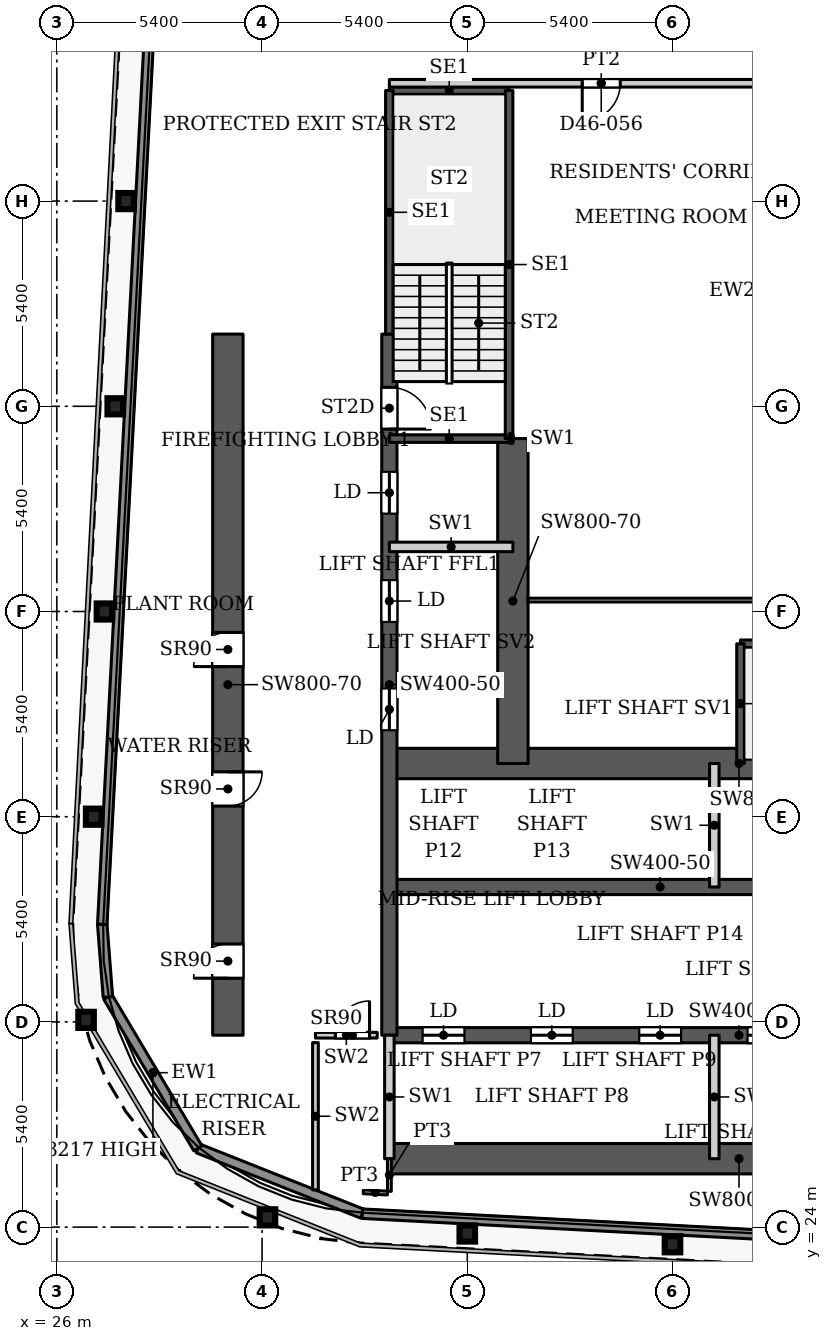
"""IFC4 building model, lengths in metres.
Left out: names, types, materials, properties, quantities, classifications, styles, units other than length and angle.
Written with IfcOpenShell. Run it as: python <this file> out.ifc"""

import sys

from ifc_helpers import new_model, si_unit, direction, frame, frame_2d, origin, origin_2d, place, context, subcontext, project, spatial, rectangle, i_section, extrude, source, transform, mapped, element, fill, save


model = new_model("IFC4")
c1 = context("Model", 3, precision=1e-05, world=origin(), true_north=direction((0.0, 1.0)))
c2 = subcontext(c1, "Body", "Model", "MODEL_VIEW")
j1 = project(units=[si_unit("LENGTHUNIT", "METRE"), si_unit("PLANEANGLEUNIT", "RADIAN")], contexts=[c1])
p1 = place(None, origin())
s1 = spatial("IfcSite", under=j1, at=p1, CompositionType="ELEMENT")
p2 = place(p1, origin())
s2 = spatial("IfcBuilding", under=s1, at=p2, CompositionType="ELEMENT")
p3 = place(p2, frame((0.0, 0.0, 199.4)))
s3 = spatial("IfcBuildingStorey", under=s2, at=p3, CompositionType="ELEMENT", Elevation=199.4)
for number, where, z_axis, x_axis in (
    (1, (42.2, 23.548, 0.0), (0.0, 0.0, 1.0), (1.0, 0.0, 0.0)),
    (2, (36.8, 23.832, 0.0), (0.0, 0.0, 1.0), (1.0, 0.0, 0.0)),
    (3, (31.542, 24.257, 0.0), (0.0, 0.0, 1.0), (1.0, 0.0, 0.0)),
    (4, (26.769, 29.454, 0.0), (0.0, 0.0, 1.0), (1.0, 0.0, 0.0)),
    (5, (26.969, 34.8, 0.0), (0.0, 0.0, 1.0), (1.0, 0.0, 0.0)),
    (6, (27.253, 40.2, 0.0), (0.0, 0.0, 1.0), (1.0, 0.0, 0.0)),
    (7, (27.537, 45.6, 0.0), (0.0, 0.0, 1.0), (1.0, 0.0, 0.0)),
    (8, (27.822, 51.0, 0.0), (0.0, 0.0, 1.0), (1.0, 0.0, 0.0)),
):
    element("IfcColumn", number, at=place(p3, frame(where, z_axis=z_axis, x_axis=x_axis)), inside=s3, PredefinedType="COLUMN", context=c2, shape_type="SweptSolid", body=[
        extrude(i_section(OverallWidth=0.409, OverallDepth=0.425, WebThickness=0.033, FlangeThickness=0.052, FilletRadius=0.013, at=origin_2d()), origin(), (0.0, 0.0, 1.0), 3.9),
    ])
p4 = place(p3, frame((34.75, 25.8, 0.0), z_axis=(0.0, 0.0, 1.0), x_axis=(1.0, 0.0, 0.0)))
e9 = element("IfcWall", 9, at=p4, inside=s3, PredefinedType="SHEAR", context=c2, shape_type="SweptSolid", body=[
    extrude(rectangle(XDim=18.4, YDim=0.8, at=frame_2d((9.2, 0.0))), origin(), (0.0, 0.0, 1.0), 3.9),
])
p5 = place(p3, frame((34.75, 29.05, 0.0), z_axis=(0.0, 0.0, 1.0), x_axis=(1.0, 0.0, 0.0)))
e10 = element("IfcWall", 10, at=p5, inside=s3, PredefinedType="SHEAR", context=c2, shape_type="SweptSolid", body=[
    extrude(rectangle(XDim=18.4, YDim=0.4, at=frame_2d((9.2, 0.0))), origin(), (0.0, 0.0, 1.0), 3.9),
])
p6 = place(p5, frame((0.875, 0.0, 0.0)))
e11 = element("IfcOpeningElement", 11, at=p6, cuts=e10, PredefinedType="OPENING", context=c2, shape_type="SweptSolid", body=[
    extrude(rectangle(XDim=1.1, YDim=2.2, at=frame_2d((0.55, 1.1))), frame((0.0, 0.21, 0.0), z_axis=(0.0, -1.0, 0.0), x_axis=(1.0, 0.0, 0.0)), (0.0, 0.0, 1.0), 0.42),
])
p7 = place(p5, frame((3.725, 0.0, 0.0)))
e12 = element("IfcOpeningElement", 12, at=p7, cuts=e10, PredefinedType="OPENING", context=c2, shape_type="SweptSolid", body=[
    extrude(rectangle(XDim=1.1, YDim=2.2, at=frame_2d((0.55, 1.1))), frame((0.0, 0.21, 0.0), z_axis=(0.0, -1.0, 0.0), x_axis=(1.0, 0.0, 0.0)), (0.0, 0.0, 1.0), 0.42),
])
p8 = place(p5, frame((6.575, 0.0, 0.0)))
e13 = element("IfcOpeningElement", 13, at=p8, cuts=e10, PredefinedType="OPENING", context=c2, shape_type="SweptSolid", body=[
    extrude(rectangle(XDim=1.1, YDim=2.2, at=frame_2d((0.55, 1.1))), frame((0.0, 0.21, 0.0), z_axis=(0.0, -1.0, 0.0), x_axis=(1.0, 0.0, 0.0)), (0.0, 0.0, 1.0), 0.42),
])
p9 = place(p5, frame((9.425, 0.0, 0.0)))
e14 = element("IfcOpeningElement", 14, at=p9, cuts=e10, PredefinedType="OPENING", context=c2, shape_type="SweptSolid", body=[
    extrude(rectangle(XDim=1.1, YDim=2.2, at=frame_2d((0.55, 1.1))), frame((0.0, 0.21, 0.0), z_axis=(0.0, -1.0, 0.0), x_axis=(1.0, 0.0, 0.0)), (0.0, 0.0, 1.0), 0.42),
])
p10 = place(p5, frame((12.275, 0.0, 0.0)))
e15 = element("IfcOpeningElement", 15, at=p10, cuts=e10, PredefinedType="OPENING", context=c2, shape_type="SweptSolid", body=[
    extrude(rectangle(XDim=1.1, YDim=2.2, at=frame_2d((0.55, 1.1))), frame((0.0, 0.21, 0.0), z_axis=(0.0, -1.0, 0.0), x_axis=(1.0, 0.0, 0.0)), (0.0, 0.0, 1.0), 0.42),
])
p11 = place(p5, frame((15.125, 0.0, 0.0)))
e16 = element("IfcOpeningElement", 16, at=p11, cuts=e10, PredefinedType="OPENING", context=c2, shape_type="SweptSolid", body=[
    extrude(rectangle(XDim=1.1, YDim=2.2, at=frame_2d((0.55, 1.1))), frame((0.0, 0.21, 0.0), z_axis=(0.0, -1.0, 0.0), x_axis=(1.0, 0.0, 0.0)), (0.0, 0.0, 1.0), 0.42),
])
p12 = place(p3, frame((34.75, 32.95, 0.0), z_axis=(0.0, 0.0, 1.0), x_axis=(1.0, 0.0, 0.0)))
e17 = element("IfcWall", 17, at=p12, inside=s3, PredefinedType="SHEAR", context=c2, shape_type="SweptSolid", body=[
    extrude(rectangle(XDim=14.25, YDim=0.4, at=frame_2d((7.125, 0.0))), origin(), (0.0, 0.0, 1.0), 3.9),
])
p13 = place(p3, frame((34.75, 36.2, 0.0), z_axis=(0.0, 0.0, 1.0), x_axis=(1.0, 0.0, 0.0)))
e18 = element("IfcWall", 18, at=p13, inside=s3, PredefinedType="SHEAR", context=c2, shape_type="SweptSolid", body=[
    extrude(rectangle(XDim=18.4, YDim=0.8, at=frame_2d((9.2, 0.0))), origin(), (0.0, 0.0, 1.0), 3.9),
])
p14 = place(p13, frame((16.9, 0.0, 0.0)))
e19 = element("IfcOpeningElement", 19, at=p14, cuts=e18, PredefinedType="OPENING", context=c2, shape_type="SweptSolid", body=[
    extrude(rectangle(XDim=1.0, YDim=2.2, at=frame_2d((0.5, 1.1))), frame((0.0, 0.41, 0.0), z_axis=(0.0, -1.0, 0.0), x_axis=(1.0, 0.0, 0.0)), (0.0, 0.0, 1.0), 0.82),
])
p15 = place(p3, frame((34.75, 29.05, 0.0), z_axis=(0.0, 0.0, 1.0), x_axis=(0.0, 1.0, 0.0)))
e20 = element("IfcWall", 20, at=p15, inside=s3, PredefinedType="SHEAR", context=c2, shape_type="SweptSolid", body=[
    extrude(rectangle(XDim=18.45, YDim=0.4, at=frame_2d((9.225, 0.0))), origin(), (0.0, 0.0, 1.0), 3.9),
])
p16 = place(p15, frame((8.025, 0.0, 0.0)))
e21 = element("IfcOpeningElement", 21, at=p16, cuts=e20, PredefinedType="OPENING", context=c2, shape_type="SweptSolid", body=[
    extrude(rectangle(XDim=1.1, YDim=2.2, at=frame_2d((0.55, 1.1))), frame((0.0, 0.21, 0.0), z_axis=(0.0, -1.0, 0.0), x_axis=(1.0, 0.0, 0.0)), (0.0, 0.0, 1.0), 0.42),
])
p17 = place(p15, frame((10.875, 0.0, 0.0)))
e22 = element("IfcOpeningElement", 22, at=p17, cuts=e20, PredefinedType="OPENING", context=c2, shape_type="SweptSolid", body=[
    extrude(rectangle(XDim=1.1, YDim=2.2, at=frame_2d((0.55, 1.1))), frame((0.0, 0.21, 0.0), z_axis=(0.0, -1.0, 0.0), x_axis=(1.0, 0.0, 0.0)), (0.0, 0.0, 1.0), 0.42),
])
p18 = place(p15, frame((13.725, 0.0, 0.0)))
e23 = element("IfcOpeningElement", 23, at=p18, cuts=e20, PredefinedType="OPENING", context=c2, shape_type="SweptSolid", body=[
    extrude(rectangle(XDim=1.1, YDim=2.2, at=frame_2d((0.55, 1.1))), frame((0.0, 0.21, 0.0), z_axis=(0.0, -1.0, 0.0), x_axis=(1.0, 0.0, 0.0)), (0.0, 0.0, 1.0), 0.42),
])
p19 = place(p15, frame((15.95, 0.0, 0.0)))
e24 = element("IfcOpeningElement", 24, at=p19, cuts=e20, PredefinedType="OPENING", context=c2, shape_type="SweptSolid", body=[
    extrude(rectangle(XDim=1.1, YDim=2.2, at=frame_2d((0.55, 1.1))), frame((0.0, 0.21, 0.0), z_axis=(0.0, -1.0, 0.0), x_axis=(1.0, 0.0, 0.0)), (0.0, 0.0, 1.0), 0.42),
])
p20 = place(p3, frame((38.0, 36.2, 0.0), z_axis=(0.0, 0.0, 1.0), x_axis=(0.0, 1.0, 0.0)))
e25 = element("IfcWall", 25, at=p20, inside=s3, PredefinedType="SHEAR", context=c2, shape_type="SweptSolid", body=[
    extrude(rectangle(XDim=8.55, YDim=0.8, at=frame_2d((4.275, 0.0))), origin(), (0.0, 0.0, 1.0), 3.9),
])
p21 = place(p3, frame((30.5, 29.05, 0.0), z_axis=(0.0, 0.0, 1.0), x_axis=(0.0, 1.0, 0.0)))
e26 = element("IfcWall", 26, at=p21, inside=s3, PredefinedType="SHEAR", context=c2, shape_type="SweptSolid", body=[
    extrude(rectangle(XDim=18.45, YDim=0.8, at=frame_2d((9.225, 0.0))), origin(), (0.0, 0.0, 1.0), 3.9),
])
p22 = place(p21, frame((1.5, 0.0, 0.0)))
e27 = element("IfcOpeningElement", 27, at=p22, cuts=e26, PredefinedType="OPENING", context=c2, shape_type="SweptSolid", body=[
    extrude(rectangle(XDim=0.9, YDim=2.2, at=frame_2d((0.45, 1.1))), frame((0.0, 0.41, 0.0), z_axis=(0.0, -1.0, 0.0), x_axis=(1.0, 0.0, 0.0)), (0.0, 0.0, 1.0), 0.82),
])
p23 = place(p21, frame((6.03, 0.0, 0.0)))
e28 = element("IfcOpeningElement", 28, at=p23, cuts=e26, PredefinedType="OPENING", context=c2, shape_type="SweptSolid", body=[
    extrude(rectangle(XDim=0.9, YDim=2.2, at=frame_2d((0.45, 1.1))), frame((0.0, 0.41, 0.0), z_axis=(0.0, -1.0, 0.0), x_axis=(1.0, 0.0, 0.0)), (0.0, 0.0, 1.0), 0.82),
])
p24 = place(p21, frame((9.7, 0.0, 0.0)))
e29 = element("IfcOpeningElement", 29, at=p24, cuts=e26, PredefinedType="OPENING", context=c2, shape_type="SweptSolid", body=[
    extrude(rectangle(XDim=0.9, YDim=2.2, at=frame_2d((0.45, 1.1))), frame((0.0, 0.41, 0.0), z_axis=(0.0, -1.0, 0.0), x_axis=(1.0, 0.0, 0.0)), (0.0, 0.0, 1.0), 0.82),
])
p25 = place(p3, frame((34.039, 24.353, 0.0), z_axis=(0.0, 0.0, 1.0), x_axis=(-0.929352825399, 0.369192803184, 0.0)))
e30 = element("IfcWall", 30, at=p25, inside=s3, PredefinedType="SOLIDWALL", context=c2, shape_type="SweptSolid", body=[
    extrude(rectangle(XDim=4.656, YDim=0.25, at=frame_2d((2.328, 0.0))), origin(), (0.0, 0.0, 1.0), 3.75),
])
p26 = place(p3, frame((29.712, 26.072, 0.0), z_axis=(0.0, 0.0, 1.0), x_axis=(-0.511028049012, 0.859564036662, 0.0)))
e31 = element("IfcWall", 31, at=p26, inside=s3, PredefinedType="SOLIDWALL", context=c2, shape_type="SweptSolid", body=[
    extrude(rectangle(XDim=4.634, YDim=0.25, at=frame_2d((2.317, 0.0))), origin(), (0.0, 0.0, 1.0), 3.217),
])
p27 = place(p3, frame((27.344, 30.055, 0.0), z_axis=(0.0, 0.0, 1.0), x_axis=(-0.077571675317, 0.99698677784, 0.0)))
e32 = element("IfcWall", 32, at=p27, inside=s3, PredefinedType="SOLIDWALL", context=c2, shape_type="SweptSolid", body=[
    extrude(rectangle(XDim=1.92, YDim=0.25, at=frame_2d((0.96, 0.0))), origin(), (0.0, 0.0, 1.0), 3.75),
])
p28 = place(p3, frame((27.195, 31.969, 0.0), z_axis=(0.0, 0.0, 1.0), x_axis=(0.052554995867, 0.998618031286, 0.0)))
e33 = element("IfcWall", 33, at=p28, inside=s3, PredefinedType="SOLIDWALL", context=c2, shape_type="SweptSolid", body=[
    extrude(rectangle(XDim=66.787, YDim=0.25, at=frame_2d((33.394, 0.0))), origin(), (0.0, 0.0, 1.0), 3.75),
])
p29 = place(p3, frame((100.586, 20.85, 0.0), z_axis=(0.0, 0.0, 1.0), x_axis=(-0.99861746497, 0.052565755559, 0.0)))
e34 = element("IfcWall", 34, at=p29, inside=s3, PredefinedType="SOLIDWALL", context=c2, shape_type="SweptSolid", body=[
    extrude(rectangle(XDim=66.639, YDim=0.25, at=frame_2d((33.319, 0.0))), origin(), (0.0, 0.0, 1.0), 3.75),
])
p30 = place(p3, frame((43.99, 39.35, 0.0), z_axis=(0.0, 0.0, 1.0), x_axis=(1.0, 0.0, 0.0)))
e35 = element("IfcWall", 35, at=p30, inside=s3, PredefinedType="SHEAR", context=c2, shape_type="SweptSolid", body=[
    extrude(rectangle(XDim=9.16, YDim=0.2, at=frame_2d((4.58, 0.0))), origin(), (0.0, 0.0, 1.0), 3.9),
])
p31 = place(p3, frame((43.99, 36.2, 0.0), z_axis=(0.0, 0.0, 1.0), x_axis=(0.0, 1.0, 0.0)))
e36 = element("IfcWall", 36, at=p31, inside=s3, PredefinedType="SHEAR", context=c2, shape_type="SweptSolid", body=[
    extrude(rectangle(XDim=3.15, YDim=0.2, at=frame_2d((1.575, 0.0))), origin(), (0.0, 0.0, 1.0), 3.9),
])
for number, where, z_axis, x_axis in (
    (37, (34.75, 44.75, 0.0), (0.0, 0.0, 1.0), (1.0, 0.0, 0.0)),
    (38, (34.75, 53.91, 0.0), (0.0, 0.0, 1.0), (1.0, 0.0, 0.0)),
):
    element("IfcWall", number, at=place(p3, frame(where, z_axis=z_axis, x_axis=x_axis)), inside=s3, PredefinedType="SHEAR", context=c2, shape_type="SweptSolid", body=[
        extrude(rectangle(XDim=3.15, YDim=0.2, at=frame_2d((1.575, 0.0))), origin(), (0.0, 0.0, 1.0), 3.9),
    ])
p32 = place(p3, frame((34.75, 47.5, 0.0), z_axis=(0.0, 0.0, 1.0), x_axis=(0.0, 1.0, 0.0)))
e39 = element("IfcWall", 39, at=p32, inside=s3, PredefinedType="SHEAR", context=c2, shape_type="SweptSolid", body=[
    extrude(rectangle(XDim=6.41, YDim=0.2, at=frame_2d((3.205, 0.0))), origin(), (0.0, 0.0, 1.0), 3.9),
])
p33 = place(p3, frame((37.9, 44.75, 0.0), z_axis=(0.0, 0.0, 1.0), x_axis=(0.0, 1.0, 0.0)))
e40 = element("IfcWall", 40, at=p33, inside=s3, PredefinedType="SHEAR", context=c2, shape_type="SweptSolid", body=[
    extrude(rectangle(XDim=9.16, YDim=0.2, at=frame_2d((4.58, 0.0))), origin(), (0.0, 0.0, 1.0), 3.9),
])
for number, where, z_axis, x_axis in (
    (41, (34.75, 25.8, 0.0), (0.0, 0.0, 1.0), (0.0, 1.0, 0.0)),
    (42, (43.3, 25.8, 0.0), (0.0, 0.0, 1.0), (0.0, 1.0, 0.0)),
    (43, (43.3, 32.95, 0.0), (0.0, 0.0, 1.0), (0.0, 1.0, 0.0)),
    (44, (34.75, 41.9, 0.0), (0.0, 0.0, 1.0), (1.0, 0.0, 0.0)),
):
    element("IfcWall", number, at=place(p3, frame(where, z_axis=z_axis, x_axis=x_axis)), inside=s3, PredefinedType="PARTITIONING", context=c2, shape_type="SweptSolid", body=[
        extrude(rectangle(XDim=3.25, YDim=0.25, at=frame_2d((1.625, 0.0))), origin(), (0.0, 0.0, 1.0), 3.9),
    ])
p34 = place(p3, frame((37.9, 44.75, 0.0), z_axis=(0.0, 0.0, 1.0), x_axis=(1.0, 0.0, 0.0)))
e45 = element("IfcWall", 45, at=p34, inside=s3, PredefinedType="PARTITIONING", context=c2, shape_type="SweptSolid", body=[
    extrude(rectangle(XDim=0.1, YDim=0.25, at=frame_2d((0.05, 0.0))), origin(), (0.0, 0.0, 1.0), 3.9),
])
p35 = place(p3, frame((32.805, 29.05, 0.0), z_axis=(0.0, 0.0, 1.0), x_axis=(1.0, 0.0, 0.0)))
e46 = element("IfcWall", 46, at=p35, inside=s3, PredefinedType="PARTITIONING", context=c2, shape_type="SweptSolid", body=[
    extrude(rectangle(XDim=1.625, YDim=0.15, at=frame_2d((0.812, 0.0))), origin(), (0.0, 0.0, 1.0), 3.9),
])
p36 = place(p35, frame((0.523, 0.0, 0.0)))
e47 = element("IfcOpeningElement", 47, at=p36, cuts=e46, PredefinedType="OPENING", context=c2, shape_type="SweptSolid", body=[
    extrude(rectangle(XDim=0.9, YDim=2.2, at=frame_2d((0.45, 1.1))), frame((0.0, 0.085, 0.0), z_axis=(0.0, -1.0, 0.0), x_axis=(1.0, 0.0, 0.0)), (0.0, 0.0, 1.0), 0.17),
])
p37 = place(p3, frame((32.805, 24.98, 0.0), z_axis=(0.0, 0.0, 1.0), x_axis=(0.0, 1.0, 0.0)))
e48 = element("IfcWall", 48, at=p37, inside=s3, PredefinedType="PARTITIONING", context=c2, shape_type="SweptSolid", body=[
    extrude(rectangle(XDim=3.875, YDim=0.15, at=frame_2d((1.938, 0.0))), origin(), (0.0, 0.0, 1.0), 3.9),
])
p38 = place(p3, frame((34.063, 24.929, 0.0), z_axis=(0.0, 0.0, 1.0), x_axis=(0.998663963404, -0.051674831376, 0.0)))
e49 = element("IfcWall", 49, at=p38, inside=s3, PredefinedType="PARTITIONING", context=c2, shape_type="SweptSolid", body=[
    extrude(rectangle(XDim=0.638, YDim=0.1, at=frame_2d((0.319, 0.0))), origin(), (0.0, 0.0, 1.0), 3.6),
])
p39 = place(p3, frame((34.75, 24.942, 0.0), z_axis=(0.0, 0.0, 1.0), x_axis=(0.0, 1.0, 0.0)))
e50 = element("IfcWall", 50, at=p39, inside=s3, PredefinedType="PARTITIONING", context=c2, shape_type="SweptSolid", body=[
    extrude(rectangle(XDim=0.858, YDim=0.1, at=frame_2d((0.429, 0.0))), origin(), (0.0, 0.0, 1.0), 3.6),
])
p40 = place(p3, frame((34.75, 54.1, 0.0), z_axis=(0.0, 0.0, 1.0), x_axis=(1.0, 0.0, 0.0)))
e51 = element("IfcWall", 51, at=p40, inside=s3, PredefinedType="PARTITIONING", context=c2, shape_type="SweptSolid", body=[
    extrude(rectangle(XDim=11.15, YDim=0.2, at=frame_2d((5.575, 0.0))), origin(), (0.0, 0.0, 1.0), 3.6),
])
p41 = place(p40, frame((5.075, 0.0, 0.0)))
e52 = element("IfcOpeningElement", 52, at=p41, cuts=e51, PredefinedType="OPENING", context=c2, shape_type="SweptSolid", body=[
    extrude(rectangle(XDim=1.0, YDim=2.1, at=frame_2d((0.5, 1.05))), frame((0.0, 0.11, 0.0), z_axis=(0.0, -1.0, 0.0), x_axis=(1.0, 0.0, 0.0)), (0.0, 0.0, 1.0), 0.22),
])
p42 = place(p3, frame((38.399, 40.5, 0.0), z_axis=(0.0, 0.0, 1.0), x_axis=(1.0, 0.0, 0.0)))
e53 = element("IfcWall", 53, at=p42, inside=s3, PredefinedType="PARTITIONING", context=c2, shape_type="SweptSolid", body=[
    extrude(rectangle(XDim=14.901, YDim=0.1, at=frame_2d((7.451, 0.0))), origin(), (0.0, 0.0, 1.0), 3.6),
])
p43 = place(p42, frame((6.801, 0.0, 0.0)))
e54 = element("IfcOpeningElement", 54, at=p43, cuts=e53, PredefinedType="OPENING", context=c2, shape_type="SweptSolid", body=[
    extrude(rectangle(XDim=1.0, YDim=2.1, at=frame_2d((0.5, 1.05))), frame((0.0, 0.06, 0.0), z_axis=(0.0, -1.0, 0.0), x_axis=(1.0, 0.0, 0.0)), (0.0, 0.0, 1.0), 0.12),
])
m1 = source(origin(), c2, "Body", "SweptSolid", [
    extrude(rectangle(XDim=1.1, YDim=2.2, at=frame_2d((0.55, 1.1))), frame((0.0, 0.025, 0.0), z_axis=(0.0, -1.0, 0.0), x_axis=(1.0, 0.0, 0.0)), (0.0, 0.0, 1.0), 0.05),
])
p44 = place(p6, origin())
e55 = element("IfcDoor", 55, at=p44, inside=s3, OperationType="SLIDING_TO_LEFT", PredefinedType="DOOR", context=c2, shape_type="MappedRepresentation", body=[
    mapped(m1, transform((0.0, 0.0, 0.0), x_axis=(1.0, 0.0, 0.0), y_axis=(0.0, 1.0, 0.0), z_axis=(0.0, 0.0, 1.0), scale=1.0)),
])
fill(e11, e55)
p45 = place(p7, origin())
e56 = element("IfcDoor", 56, at=p45, inside=s3, OperationType="SLIDING_TO_LEFT", PredefinedType="DOOR", context=c2, shape_type="MappedRepresentation", body=[
    mapped(m1, transform((0.0, 0.0, 0.0), x_axis=(1.0, 0.0, 0.0), y_axis=(0.0, 1.0, 0.0), z_axis=(0.0, 0.0, 1.0), scale=1.0)),
])
fill(e12, e56)
p46 = place(p8, origin())
e57 = element("IfcDoor", 57, at=p46, inside=s3, OperationType="SLIDING_TO_LEFT", PredefinedType="DOOR", context=c2, shape_type="MappedRepresentation", body=[
    mapped(m1, transform((0.0, 0.0, 0.0), x_axis=(1.0, 0.0, 0.0), y_axis=(0.0, 1.0, 0.0), z_axis=(0.0, 0.0, 1.0), scale=1.0)),
])
fill(e13, e57)
p47 = place(p9, origin())
e58 = element("IfcDoor", 58, at=p47, inside=s3, OperationType="SLIDING_TO_LEFT", PredefinedType="DOOR", context=c2, shape_type="MappedRepresentation", body=[
    mapped(m1, transform((0.0, 0.0, 0.0), x_axis=(1.0, 0.0, 0.0), y_axis=(0.0, 1.0, 0.0), z_axis=(0.0, 0.0, 1.0), scale=1.0)),
])
fill(e14, e58)
p48 = place(p16, origin())
e59 = element("IfcDoor", 59, at=p48, inside=s3, OperationType="SLIDING_TO_LEFT", PredefinedType="DOOR", context=c2, shape_type="MappedRepresentation", body=[
    mapped(m1, transform((0.0, 0.0, 0.0), x_axis=(1.0, 0.0, 0.0), y_axis=(0.0, 1.0, 0.0), z_axis=(0.0, 0.0, 1.0), scale=1.0)),
])
fill(e21, e59)
p49 = place(p17, origin())
e60 = element("IfcDoor", 60, at=p49, inside=s3, OperationType="SLIDING_TO_LEFT", PredefinedType="DOOR", context=c2, shape_type="MappedRepresentation", body=[
    mapped(m1, transform((0.0, 0.0, 0.0), x_axis=(1.0, 0.0, 0.0), y_axis=(0.0, 1.0, 0.0), z_axis=(0.0, 0.0, 1.0), scale=1.0)),
])
fill(e22, e60)
p50 = place(p18, origin())
e61 = element("IfcDoor", 61, at=p50, inside=s3, OperationType="SLIDING_TO_LEFT", PredefinedType="DOOR", context=c2, shape_type="MappedRepresentation", body=[
    mapped(m1, transform((0.0, 0.0, 0.0), x_axis=(1.0, 0.0, 0.0), y_axis=(0.0, 1.0, 0.0), z_axis=(0.0, 0.0, 1.0), scale=1.0)),
])
fill(e23, e61)
m2 = source(origin(), c2, "Body", "SweptSolid", [
    extrude(rectangle(XDim=0.9, YDim=2.2, at=frame_2d((0.45, 1.1))), frame((0.0, 0.025, 0.0), z_axis=(0.0, -1.0, 0.0), x_axis=(1.0, 0.0, 0.0)), (0.0, 0.0, 1.0), 0.05),
])
p51 = place(p22, origin())
e62 = element("IfcDoor", 62, at=p51, inside=s3, OperationType="SINGLE_SWING_LEFT", PredefinedType="DOOR", context=c2, shape_type="MappedRepresentation", body=[
    mapped(m2, transform((0.0, 0.0, 0.0), x_axis=(1.0, 0.0, 0.0), y_axis=(0.0, 1.0, 0.0), z_axis=(0.0, 0.0, 1.0), scale=1.0)),
])
fill(e27, e62)
p52 = place(p23, origin())
e63 = element("IfcDoor", 63, at=p52, inside=s3, OperationType="SINGLE_SWING_RIGHT", PredefinedType="DOOR", context=c2, shape_type="MappedRepresentation", body=[
    mapped(m2, transform((0.0, 0.0, 0.0), x_axis=(1.0, 0.0, 0.0), y_axis=(0.0, 1.0, 0.0), z_axis=(0.0, 0.0, 1.0), scale=1.0)),
])
fill(e28, e63)
p53 = place(p24, origin())
e64 = element("IfcDoor", 64, at=p53, inside=s3, OperationType="SINGLE_SWING_LEFT", PredefinedType="DOOR", context=c2, shape_type="MappedRepresentation", body=[
    mapped(m2, transform((0.0, 0.0, 0.0), x_axis=(1.0, 0.0, 0.0), y_axis=(0.0, 1.0, 0.0), z_axis=(0.0, 0.0, 1.0), scale=1.0)),
])
fill(e29, e64)
p54 = place(p36, origin())
e65 = element("IfcDoor", 65, at=p54, inside=s3, OperationType="SINGLE_SWING_LEFT", PredefinedType="DOOR", context=c2, shape_type="MappedRepresentation", body=[
    mapped(m2, transform((0.0, 0.0, 0.0), x_axis=(1.0, 0.0, 0.0), y_axis=(0.0, 1.0, 0.0), z_axis=(0.0, 0.0, 1.0), scale=1.0)),
])
fill(e47, e65)
m3 = source(origin(), c2, "Body", "SweptSolid", [
    extrude(rectangle(XDim=1.1, YDim=2.2, at=frame_2d((0.55, 1.1))), frame((0.0, 0.025, 0.0), z_axis=(0.0, -1.0, 0.0), x_axis=(1.0, 0.0, 0.0)), (0.0, 0.0, 1.0), 0.05),
])
p55 = place(p19, origin())
e66 = element("IfcDoor", 66, at=p55, inside=s3, OperationType="SINGLE_SWING_RIGHT", PredefinedType="DOOR", context=c2, shape_type="MappedRepresentation", body=[
    mapped(m3, transform((0.0, 0.0, 0.0), x_axis=(1.0, 0.0, 0.0), y_axis=(0.0, 1.0, 0.0), z_axis=(0.0, 0.0, 1.0), scale=1.0)),
])
fill(e24, e66)
m4 = source(origin(), c2, "Body", "SweptSolid", [
    extrude(rectangle(XDim=1.0, YDim=2.1, at=frame_2d((0.5, 1.05))), frame((0.0, 0.025, 0.0), z_axis=(0.0, -1.0, 0.0), x_axis=(1.0, 0.0, 0.0)), (0.0, 0.0, 1.0), 0.05),
])
p56 = place(p41, origin())
e67 = element("IfcDoor", 67, at=p56, inside=s3, OperationType="SINGLE_SWING_RIGHT", PredefinedType="DOOR", context=c2, shape_type="MappedRepresentation", body=[
    mapped(m4, transform((0.0, 0.0, 0.0), x_axis=(1.0, 0.0, 0.0), y_axis=(0.0, 1.0, 0.0), z_axis=(0.0, 0.0, 1.0), scale=1.0)),
])
fill(e52, e67)
save(model, sys.argv[1])
